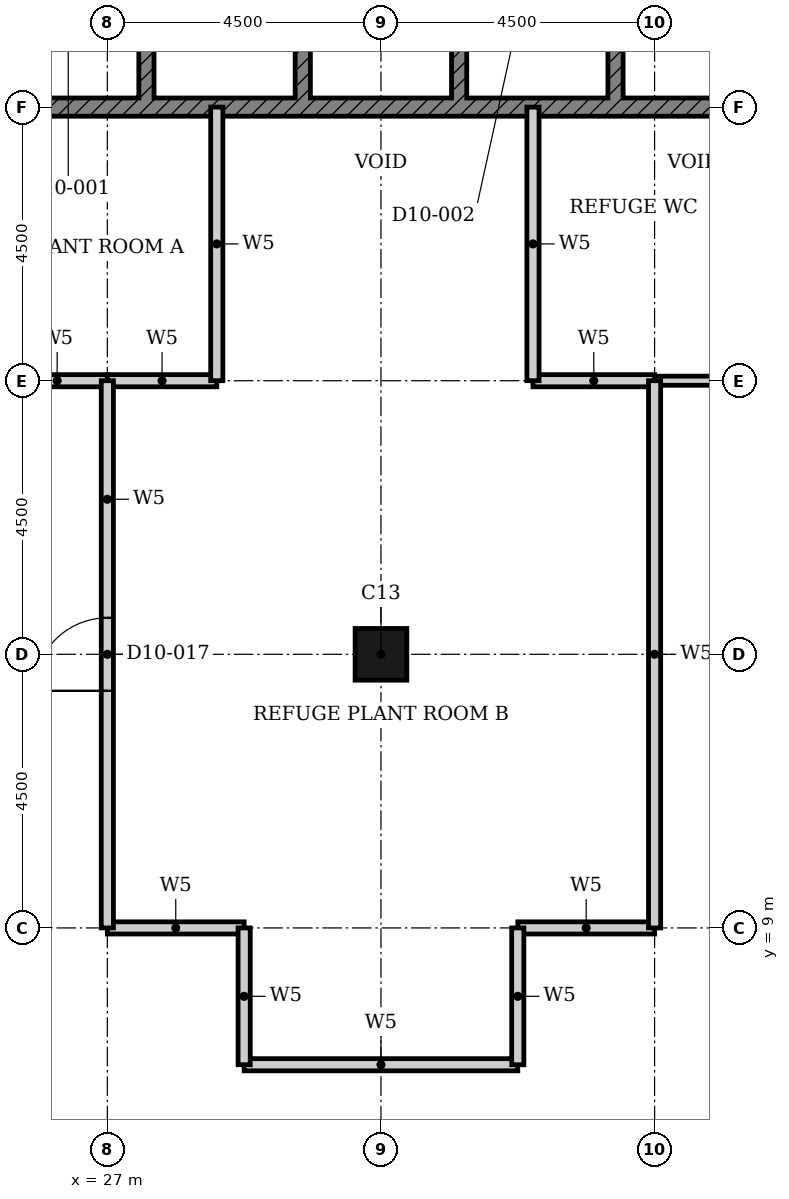
"""IFC4 building model, lengths in metres.
Left out: names, types, materials, properties, quantities, classifications, styles, units other than length and angle.
Written with IfcOpenShell. Run it as: python <this file> out.ifc"""

import sys

from ifc_helpers import new_model, si_unit, direction, frame, frame_2d, origin, origin_2d, place, context, subcontext, project, spatial, polyline, rectangle, hollow_rectangle, outline, extrude, element, fill, save


model = new_model("IFC4")
c1 = context("Model", 3, precision=1e-05, world=origin(), true_north=direction((0.0, 1.0)))
c2 = subcontext(c1, "Body", "Model", "MODEL_VIEW")
j1 = project(units=[si_unit("LENGTHUNIT", "METRE"), si_unit("PLANEANGLEUNIT", "RADIAN")], contexts=[c1])
p1 = place(None, origin())
s1 = spatial("IfcSite", under=j1, at=p1, CompositionType="ELEMENT")
p2 = place(p1, origin())
s2 = spatial("IfcBuilding", under=s1, at=p2, CompositionType="ELEMENT")
p3 = place(p2, frame((0.0, 0.0, 48.0)))
s3 = spatial("IfcBuildingStorey", under=s2, at=p3, CompositionType="ELEMENT", Elevation=48.0)
p4 = place(p3, frame((31.5, 13.5, 0.0), z_axis=(0.0, 0.0, 1.0), x_axis=(1.0, 0.0, 0.0)))
e1 = element("IfcColumn", 1, at=p4, inside=s3, PredefinedType="COLUMN", context=c2, shape_type="SweptSolid", body=[
    extrude(hollow_rectangle(XDim=0.85, YDim=0.85, WallThickness=0.026, at=origin_2d()), origin(), (0.0, 0.0, 1.0), 4.8),
])
p5 = place(p3, origin())
e2 = element("IfcWall", 2, at=p5, inside=s3, PredefinedType="SHEAR", context=c2, shape_type="SweptSolid", body=[
    extrude(outline(polyline([(22.375, 22.35), (38.053, 22.35), (38.053, 25.275), (37.803, 25.275), (37.803, 22.65), (35.482, 22.65), (35.482, 25.275), (35.232, 25.275), (35.232, 22.65), (32.911, 22.65), (32.911, 25.275), (32.661, 25.275), (32.661, 22.65), (30.339, 22.65), (30.339, 25.275), (30.089, 25.275), (30.089, 22.65), (27.768, 22.65), (27.768, 25.275), (27.518, 25.275), (27.518, 22.65), (25.197, 22.65), (25.197, 25.275), (24.947, 25.275), (24.947, 22.65), (22.625, 22.65), (22.625, 25.275), (22.375, 25.275), (22.375, 22.35)])), origin(), (0.0, 0.0, 1.0), 4.5),
])
p6 = place(p3, frame((36.0, 18.0, 0.0), z_axis=(0.0, 0.0, 1.0), x_axis=(1.0, 0.0, 0.0)))
e3 = element("IfcWall", 3, at=p6, inside=s3, PredefinedType="PARTITIONING", context=c2, shape_type="SweptSolid", body=[
    extrude(rectangle(XDim=2.0, YDim=0.15, at=frame_2d((1.0, 0.0))), origin(), (0.0, 0.0, 1.0), 4.5),
])
p7 = place(p3, frame((22.5, 18.0, 0.0), z_axis=(0.0, 0.0, 1.0), x_axis=(1.0, 0.0, 0.0)))
e4 = element("IfcWall", 4, at=p7, inside=s3, PredefinedType="PARTITIONING", context=c2, shape_type="SweptSolid", body=[
    extrude(rectangle(XDim=4.5, YDim=0.2, at=frame_2d((2.25, 0.0))), origin(), (0.0, 0.0, 1.0), 4.5),
])
p8 = place(p7, frame((1.65, 0.0, 0.0)))
e5 = element("IfcOpeningElement", 5, at=p8, cuts=e4, PredefinedType="OPENING", context=c2, shape_type="SweptSolid", body=[
    extrude(rectangle(XDim=1.2, YDim=2.1, at=frame_2d((0.6, 1.05))), frame((0.0, 0.11, 0.0), z_axis=(0.0, -1.0, 0.0), x_axis=(1.0, 0.0, 0.0)), (0.0, 0.0, 1.0), 0.22),
])
p9 = place(p3, frame((27.0, 18.0, 0.0), z_axis=(0.0, 0.0, 1.0), x_axis=(1.0, 0.0, 0.0)))
e6 = element("IfcWall", 6, at=p9, inside=s3, PredefinedType="PARTITIONING", context=c2, shape_type="SweptSolid", body=[
    extrude(rectangle(XDim=1.8, YDim=0.2, at=frame_2d((0.9, 0.0))), origin(), (0.0, 0.0, 1.0), 4.5),
])
p10 = place(p3, frame((34.0, 18.0, 0.0), z_axis=(0.0, 0.0, 1.0), x_axis=(1.0, 0.0, 0.0)))
e7 = element("IfcWall", 7, at=p10, inside=s3, PredefinedType="PARTITIONING", context=c2, shape_type="SweptSolid", body=[
    extrude(rectangle(XDim=2.0, YDim=0.2, at=frame_2d((1.0, 0.0))), origin(), (0.0, 0.0, 1.0), 4.5),
])
p11 = place(p3, frame((29.25, 6.75, 0.0), z_axis=(0.0, 0.0, 1.0), x_axis=(1.0, 0.0, 0.0)))
e8 = element("IfcWall", 8, at=p11, inside=s3, PredefinedType="PARTITIONING", context=c2, shape_type="SweptSolid", body=[
    extrude(rectangle(XDim=4.5, YDim=0.2, at=frame_2d((2.25, 0.0))), origin(), (0.0, 0.0, 1.0), 4.5),
])
for number, where, z_axis, x_axis in (
    (9, (27.0, 9.0, 0.0), (0.0, 0.0, 1.0), (1.0, 0.0, 0.0)),
    (10, (33.75, 9.0, 0.0), (0.0, 0.0, 1.0), (1.0, 0.0, 0.0)),
):
    element("IfcWall", number, at=place(p3, frame(where, z_axis=z_axis, x_axis=x_axis)), inside=s3, PredefinedType="PARTITIONING", context=c2, shape_type="SweptSolid", body=[
        extrude(rectangle(XDim=2.25, YDim=0.2, at=frame_2d((1.125, 0.0))), origin(), (0.0, 0.0, 1.0), 4.5),
    ])
p12 = place(p3, frame((27.0, 9.0, 0.0), z_axis=(0.0, 0.0, 1.0), x_axis=(0.0, 1.0, 0.0)))
e11 = element("IfcWall", 11, at=p12, inside=s3, PredefinedType="PARTITIONING", context=c2, shape_type="SweptSolid", body=[
    extrude(rectangle(XDim=9.0, YDim=0.2, at=frame_2d((4.5, 0.0))), origin(), (0.0, 0.0, 1.0), 3.78),
])
p13 = place(p12, frame((3.9, 0.0, 0.0)))
e12 = element("IfcOpeningElement", 12, at=p13, cuts=e11, PredefinedType="OPENING", context=c2, shape_type="SweptSolid", body=[
    extrude(rectangle(XDim=1.2, YDim=2.1, at=frame_2d((0.6, 1.05))), frame((0.0, 0.11, 0.0), z_axis=(0.0, -1.0, 0.0), x_axis=(1.0, 0.0, 0.0)), (0.0, 0.0, 1.0), 0.22),
])
p14 = place(p3, frame((28.8, 18.0, 0.0), z_axis=(0.0, 0.0, 1.0), x_axis=(0.0, 1.0, 0.0)))
e13 = element("IfcWall", 13, at=p14, inside=s3, PredefinedType="PARTITIONING", context=c2, shape_type="SweptSolid", body=[
    extrude(rectangle(XDim=4.5, YDim=0.2, at=frame_2d((2.25, 0.0))), origin(), (0.0, 0.0, 1.0), 4.5),
])
for number, where, z_axis, x_axis in (
    (14, (29.25, 6.75, 0.0), (0.0, 0.0, 1.0), (0.0, 1.0, 0.0)),
    (15, (33.75, 6.75, 0.0), (0.0, 0.0, 1.0), (0.0, 1.0, 0.0)),
):
    element("IfcWall", number, at=place(p3, frame(where, z_axis=z_axis, x_axis=x_axis)), inside=s3, PredefinedType="PARTITIONING", context=c2, shape_type="SweptSolid", body=[
        extrude(rectangle(XDim=2.25, YDim=0.2, at=frame_2d((1.125, 0.0))), origin(), (0.0, 0.0, 1.0), 4.5),
    ])
p15 = place(p3, frame((34.0, 18.0, 0.0), z_axis=(0.0, 0.0, 1.0), x_axis=(0.0, 1.0, 0.0)))
e16 = element("IfcWall", 16, at=p15, inside=s3, PredefinedType="PARTITIONING", context=c2, shape_type="SweptSolid", body=[
    extrude(rectangle(XDim=4.5, YDim=0.2, at=frame_2d((2.25, 0.0))), origin(), (0.0, 0.0, 1.0), 4.5),
])
p16 = place(p3, frame((36.0, 9.0, 0.0), z_axis=(0.0, 0.0, 1.0), x_axis=(0.0, 1.0, 0.0)))
e17 = element("IfcWall", 17, at=p16, inside=s3, PredefinedType="PARTITIONING", context=c2, shape_type="SweptSolid", body=[
    extrude(rectangle(XDim=9.0, YDim=0.2, at=frame_2d((4.5, 0.0))), origin(), (0.0, 0.0, 1.0), 3.78),
])
p17 = place(p13, origin())
e18 = element("IfcDoor", 18, at=p17, inside=s3, OperationType="SINGLE_SWING_LEFT", PredefinedType="DOOR", context=c2, shape_type="SweptSolid", body=[
    extrude(rectangle(XDim=1.2, YDim=2.1, at=frame_2d((0.6, 1.05))), frame((0.0, 0.025, 0.0), z_axis=(0.0, -1.0, 0.0), x_axis=(1.0, 0.0, 0.0)), (0.0, 0.0, 1.0), 0.05),
])
fill(e12, e18)
save(model, sys.argv[1])
